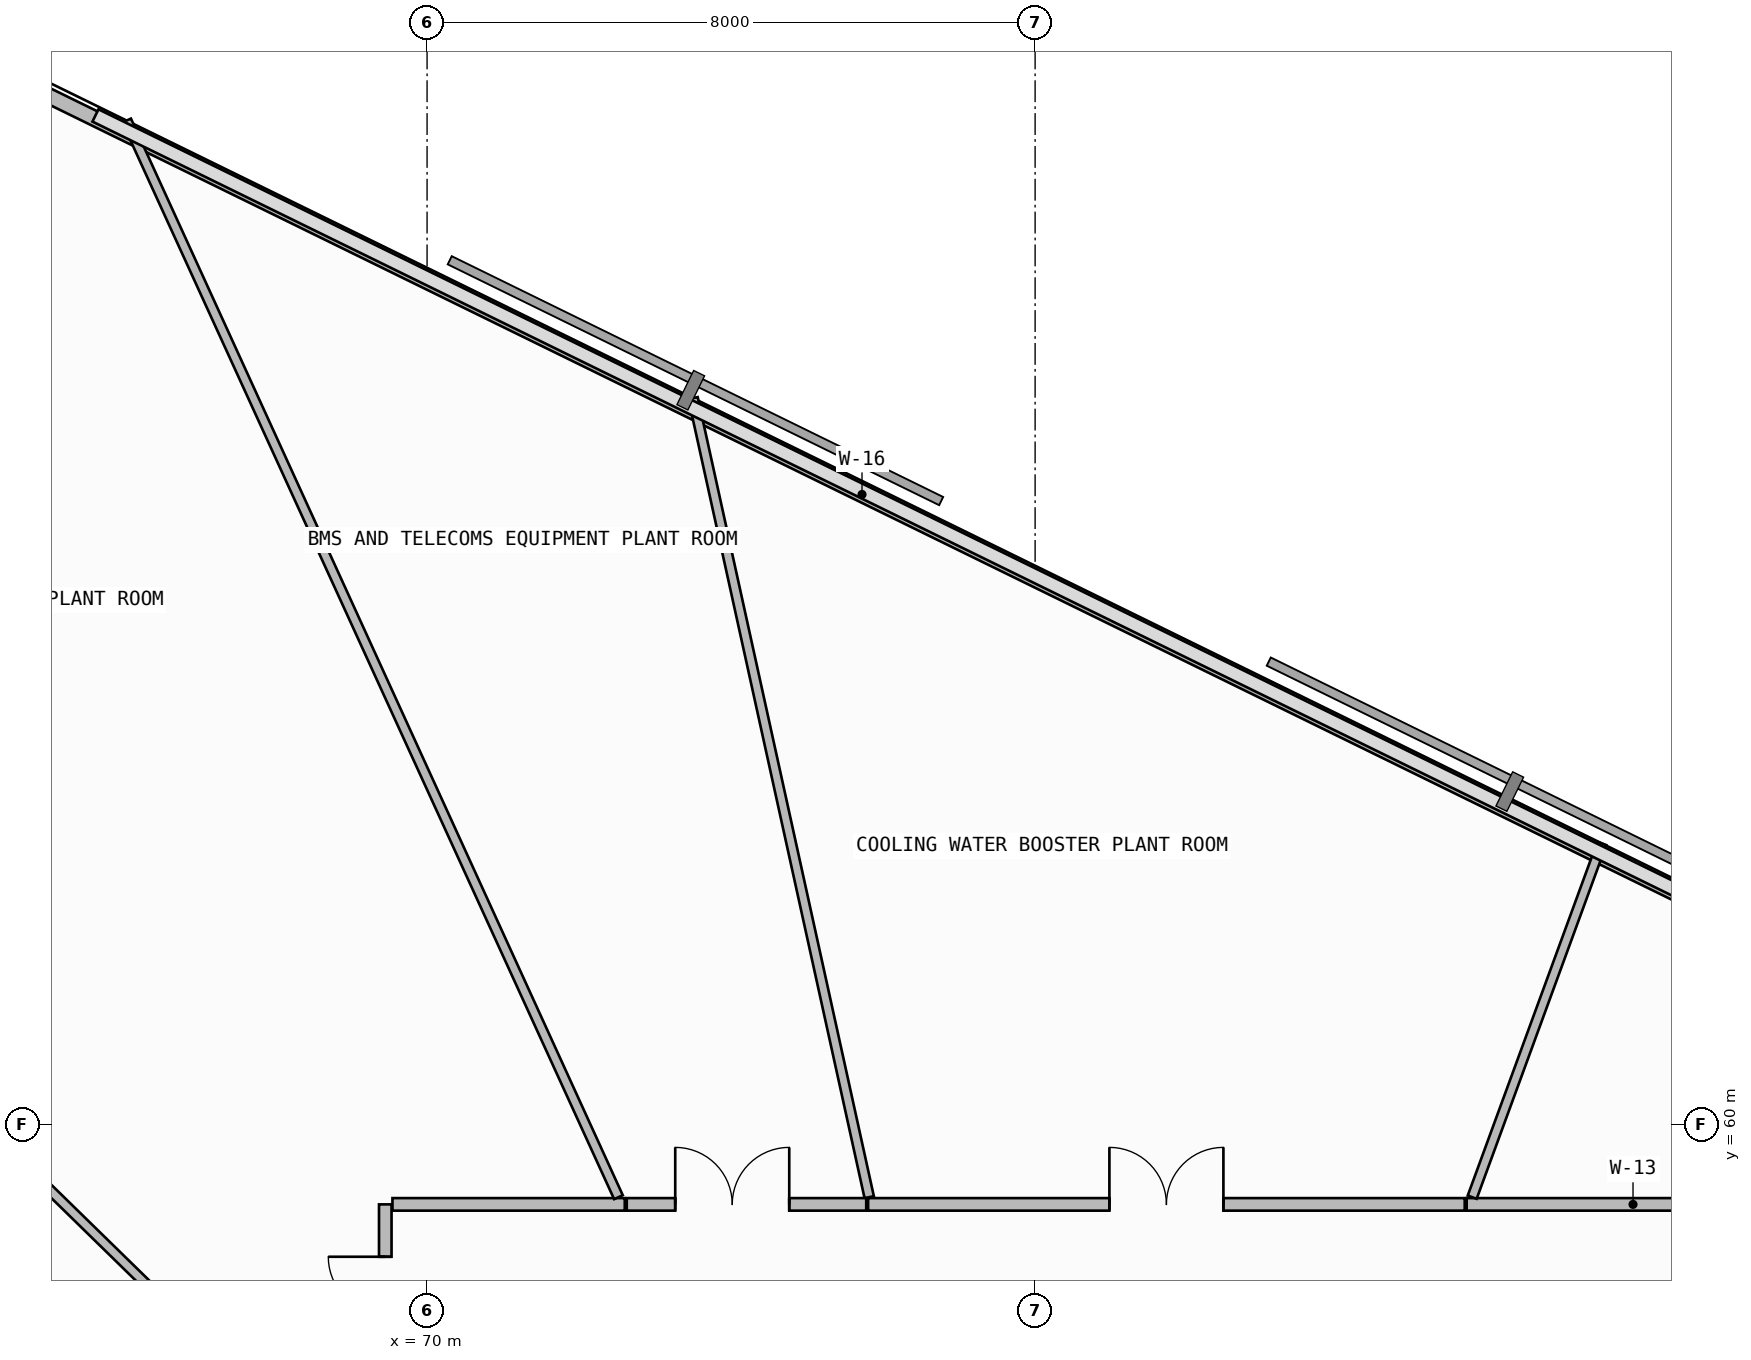
"""IFC4 building model, lengths in metres.
Left out: names, types, materials, properties, quantities, classifications, styles, units other than length and angle.
Written with IfcOpenShell. Run it as: python <this file> out.ifc"""

import sys

from ifc_helpers import new_model, si_unit, direction, frame, frame_2d, origin, place, context, subcontext, project, spatial, rectangle, extrude, element, fill, save


model = new_model("IFC4")
c1 = context("Model", 3, precision=1e-05, world=origin(), true_north=direction((0.0, 1.0)))
c2 = subcontext(c1, "Body", "Model", "MODEL_VIEW")
j1 = project(units=[si_unit("LENGTHUNIT", "METRE"), si_unit("PLANEANGLEUNIT", "RADIAN")], contexts=[c1])
p1 = place(None, origin())
s1 = spatial("IfcSite", under=j1, at=p1, CompositionType="ELEMENT")
p2 = place(p1, origin())
s2 = spatial("IfcBuilding", under=s1, at=p2, CompositionType="ELEMENT")
p3 = place(p2, frame((0.0, 0.0, 128.1)))
s3 = spatial("IfcBuildingStorey", under=s2, at=p3, CompositionType="ELEMENT", Elevation=128.1)
p4 = place(p3, frame((90.964, 60.822, 0.0), z_axis=(0.0, 0.0, 1.0), x_axis=(-0.897994223128, 0.440007244519, 0.0)))
e1 = element("IfcWall", 1, at=p4, inside=s3, PredefinedType="PARAPET", context=c2, shape_type="SweptSolid", body=[
    extrude(rectangle(XDim=33.947, YDim=0.2, at=frame_2d((16.973, 0.0))), origin(), (0.0, 0.0, 1.0), 1.15),
])
p5 = place(p3, frame((88.055, 58.95, 0.0), z_axis=(0.0, 0.0, 1.0), x_axis=(-1.0, 0.0, 0.0)))
e2 = element("IfcWall", 2, at=p5, inside=s3, PredefinedType="PARTITIONING", context=c2, shape_type="SweptSolid", body=[
    extrude(rectangle(XDim=4.378, YDim=0.165, at=frame_2d((2.189, 0.0))), origin(), (0.0, 0.0, 1.0), 2.777),
])
p6 = place(p3, frame((83.751, 59.044, 0.0), z_axis=(0.0, 0.0, 1.0), x_axis=(0.343972438463, 0.938979745031, 0.0)))
e3 = element("IfcWall", 3, at=p6, inside=s3, PredefinedType="PARTITIONING", context=c2, shape_type="SweptSolid", body=[
    extrude(rectangle(XDim=4.957, YDim=0.125, at=frame_2d((2.479, 0.0))), origin(), (0.0, 0.0, 1.0), 3.8),
])
p7 = place(p3, frame((83.652, 58.95, 0.0), z_axis=(0.0, 0.0, 1.0), x_axis=(-1.0, 0.0, 0.0)))
e4 = element("IfcWall", 4, at=p7, inside=s3, PredefinedType="PARTITIONING", context=c2, shape_type="SweptSolid", body=[
    extrude(rectangle(XDim=7.85, YDim=0.165, at=frame_2d((3.925, 0.0))), origin(), (0.0, 0.0, 1.0), 3.8),
])
p8 = place(p7, frame((3.175, 0.0, 0.0)))
e5 = element("IfcOpeningElement", 5, at=p8, cuts=e4, PredefinedType="OPENING", context=c2, shape_type="SweptSolid", body=[
    extrude(rectangle(XDim=1.5, YDim=2.25, at=frame_2d((0.75, 1.125))), frame((0.0, 0.093, 0.0), z_axis=(0.0, -1.0, 0.0), x_axis=(1.0, 0.0, 0.0)), (0.0, 0.0, 1.0), 0.185),
])
p9 = place(p3, frame((75.817, 59.044, 0.0), z_axis=(0.0, 0.0, 1.0), x_axis=(-0.215290072493, 0.976550144481, 0.0)))
e6 = element("IfcWall", 6, at=p9, inside=s3, PredefinedType="PARTITIONING", context=c2, shape_type="SweptSolid", body=[
    extrude(rectangle(XDim=10.765, YDim=0.125, at=frame_2d((5.383, 0.0))), origin(), (0.0, 0.0, 1.0), 3.8),
])
p10 = place(p3, frame((69.45, 58.95, 0.0), z_axis=(0.0, 0.0, 1.0), x_axis=(0.0, -1.0, 0.0)))
e7 = element("IfcWall", 7, at=p10, inside=s3, PredefinedType="PARTITIONING", context=c2, shape_type="SweptSolid", body=[
    extrude(rectangle(XDim=4.123, YDim=0.165, at=frame_2d((2.062, 0.0))), origin(), (0.0, 0.0, 1.0), 2.777),
])
p11 = place(p10, frame((0.689, 0.0, 0.0)))
e8 = element("IfcOpeningElement", 8, at=p11, cuts=e7, PredefinedType="OPENING", context=c2, shape_type="SweptSolid", body=[
    extrude(rectangle(XDim=1.5, YDim=2.25, at=frame_2d((0.75, 1.125))), frame((0.0, 0.093, 0.0), z_axis=(0.0, -1.0, 0.0), x_axis=(1.0, 0.0, 0.0)), (0.0, 0.0, 1.0), 0.185),
])
p12 = place(p3, frame((72.601, 58.95, 0.0), z_axis=(0.0, 0.0, 1.0), x_axis=(-1.0, 0.0, 0.0)))
e9 = element("IfcWall", 9, at=p12, inside=s3, PredefinedType="PARTITIONING", context=c2, shape_type="SweptSolid", body=[
    extrude(rectangle(XDim=3.056, YDim=0.165, at=frame_2d((1.528, 0.0))), origin(), (0.0, 0.0, 1.0), 2.777),
])
p13 = place(p3, frame((66.047, 73.209, 0.0), z_axis=(0.0, 0.0, 1.0), x_axis=(0.415532629707, -0.909578272415, 0.0)))
e10 = element("IfcWall", 10, at=p13, inside=s3, PredefinedType="PARTITIONING", context=c2, shape_type="SweptSolid", body=[
    extrude(rectangle(XDim=15.573, YDim=0.125, at=frame_2d((7.786, 0.0))), origin(), (0.0, 0.0, 1.0), 3.8),
])
p14 = place(p3, frame((69.355, 54.919, 0.0), z_axis=(0.0, 0.0, 1.0), x_axis=(-0.715183960521, 0.698936265058, 0.0)))
e11 = element("IfcWall", 11, at=p14, inside=s3, PredefinedType="PARTITIONING", context=c2, shape_type="SweptSolid", body=[
    extrude(rectangle(XDim=13.689, YDim=0.125, at=frame_2d((6.844, 0.0))), origin(), (0.0, 0.0, 1.0), 2.777),
])
p15 = place(p3, frame((75.778, 58.95, 0.0), z_axis=(0.0, 0.0, 1.0), x_axis=(-1.0, 0.0, 0.0)))
e12 = element("IfcWall", 12, at=p15, inside=s3, PredefinedType="PARTITIONING", context=c2, shape_type="SweptSolid", body=[
    extrude(rectangle(XDim=3.151, YDim=0.165, at=frame_2d((1.575, 0.0))), origin(), (0.0, 0.0, 1.0), 3.8),
])
p16 = place(p15, frame((1.013, 0.0, 0.0)))
e13 = element("IfcOpeningElement", 13, at=p16, cuts=e12, PredefinedType="OPENING", context=c2, shape_type="SweptSolid", body=[
    extrude(rectangle(XDim=1.5, YDim=2.25, at=frame_2d((0.75, 1.125))), frame((0.0, 0.093, 0.0), z_axis=(0.0, -1.0, 0.0), x_axis=(1.0, 0.0, 0.0)), (0.0, 0.0, 1.0), 0.185),
])
p17 = place(p8, frame((1.5, 0.0, 0.0), z_axis=(0.0, 0.0, 1.0), x_axis=(-1.0, 0.0, 0.0)))
e14 = element("IfcDoor", 14, at=p17, inside=s3, OperationType="DOUBLE_DOOR_SINGLE_SWING", PredefinedType="DOOR", context=c2, shape_type="SweptSolid", body=[
    extrude(rectangle(XDim=1.5, YDim=2.25, at=frame_2d((0.75, 1.125))), frame((0.0, 0.025, 0.0), z_axis=(0.0, -1.0, 0.0), x_axis=(1.0, 0.0, 0.0)), (0.0, 0.0, 1.0), 0.05),
])
fill(e5, e14)
p18 = place(p11, frame((1.5, 0.0, 0.0), z_axis=(0.0, 0.0, 1.0), x_axis=(-1.0, 0.0, 0.0)))
e15 = element("IfcDoor", 15, at=p18, inside=s3, OperationType="DOUBLE_DOOR_SINGLE_SWING", PredefinedType="DOOR", context=c2, shape_type="SweptSolid", body=[
    extrude(rectangle(XDim=1.5, YDim=2.25, at=frame_2d((0.75, 1.125))), frame((0.0, 0.025, 0.0), z_axis=(0.0, -1.0, 0.0), x_axis=(1.0, 0.0, 0.0)), (0.0, 0.0, 1.0), 0.05),
])
fill(e8, e15)
p19 = place(p16, frame((1.5, 0.0, 0.0), z_axis=(0.0, 0.0, 1.0), x_axis=(-1.0, 0.0, 0.0)))
e16 = element("IfcDoor", 16, at=p19, inside=s3, OperationType="DOUBLE_DOOR_SINGLE_SWING", PredefinedType="DOOR", context=c2, shape_type="SweptSolid", body=[
    extrude(rectangle(XDim=1.5, YDim=2.25, at=frame_2d((0.75, 1.125))), frame((0.0, 0.025, 0.0), z_axis=(0.0, -1.0, 0.0), x_axis=(1.0, 0.0, 0.0)), (0.0, 0.0, 1.0), 0.05),
])
fill(e13, e16)
save(model, sys.argv[1])
